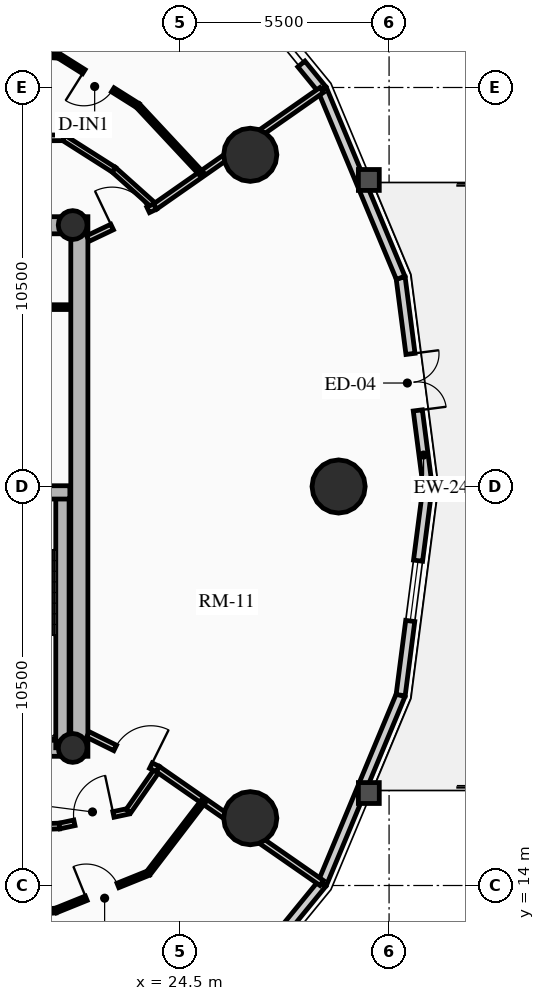
"""IFC4 building model, lengths in metres.
Left out: names, types, materials, properties, quantities, classifications, styles, units other than length and angle.
Written with IfcOpenShell. Run it as: python <this file> out.ifc"""

import sys

from ifc_helpers import new_model, si_unit, direction, frame, frame_2d, origin, origin_2d, place, context, subcontext, project, spatial, rectangle, circle, hollow_circle, extrude, source, transform, mapped, element, fill, save


model = new_model("IFC4")
c1 = context("Model", 3, precision=1e-05, world=origin(), true_north=direction((0.0, 1.0)))
c2 = subcontext(c1, "Body", "Model", "MODEL_VIEW")
j1 = project(units=[si_unit("LENGTHUNIT", "METRE"), si_unit("PLANEANGLEUNIT", "RADIAN")], contexts=[c1])
p1 = place(None, origin())
s1 = spatial("IfcSite", under=j1, at=p1, CompositionType="ELEMENT")
p2 = place(p1, origin())
s2 = spatial("IfcBuilding", under=s1, at=p2, CompositionType="ELEMENT")
p3 = place(p2, frame((0.0, 0.0, 144.04)))
s3 = spatial("IfcBuildingStorey", under=s2, at=p3, CompositionType="ELEMENT", Elevation=144.04)
p4 = place(p3, frame((21.85, 17.4, 0.0), z_axis=(0.0, 0.0, 1.0), x_axis=(0.0, 1.0, 0.0)))
e1 = element("IfcWall", 1, at=p4, inside=s3, PredefinedType="SHEAR", context=c2, shape_type="SweptSolid", body=[
    extrude(rectangle(XDim=14.2, YDim=0.45, at=frame_2d((7.1, 0.0))), origin(), (0.0, 0.0, 1.0), 3.06),
])
p5 = place(p3, frame((11.15, 17.625, 0.0), z_axis=(0.0, 0.0, 1.0), x_axis=(1.0, 0.0, 0.0)))
e2 = element("IfcWall", 2, at=p5, inside=s3, PredefinedType="SHEAR", context=c2, shape_type="SweptSolid", body=[
    extrude(rectangle(XDim=10.7, YDim=0.45, at=frame_2d((5.35, 0.0))), origin(), (0.0, 0.0, 1.0), 3.06),
])
m1 = source(origin(), c2, "Body", "SweptSolid", [
    extrude(rectangle(XDim=1.5, YDim=2.02, at=frame_2d((0.75, 1.01))), frame((0.0, 0.235, 0.0), z_axis=(0.0, -1.0, 0.0), x_axis=(1.0, 0.0, 0.0)), (0.0, 0.0, 1.0), 0.47),
])
p6 = place(p5, frame((5.45, 0.0, 0.0)))
e3 = element("IfcOpeningElement", 3, at=p6, cuts=e2, PredefinedType="OPENING", context=c2, shape_type="MappedRepresentation", body=[
    mapped(m1, transform((0.0, 0.0, 0.0), x_axis=(1.0, 0.0, 0.0), y_axis=(0.0, 1.0, 0.0), z_axis=(0.0, 0.0, 1.0), scale=1.0)),
])
p7 = place(p3, frame((11.15, 31.375, 0.0), z_axis=(0.0, 0.0, 1.0), x_axis=(1.0, 0.0, 0.0)))
e4 = element("IfcWall", 4, at=p7, inside=s3, PredefinedType="SHEAR", context=c2, shape_type="SweptSolid", body=[
    extrude(rectangle(XDim=10.7, YDim=0.45, at=frame_2d((5.35, 0.0))), origin(), (0.0, 0.0, 1.0), 3.06),
])
p8 = place(p7, frame((4.6, 0.0, 0.0)))
e5 = element("IfcOpeningElement", 5, at=p8, cuts=e4, PredefinedType="OPENING", context=c2, shape_type="MappedRepresentation", body=[
    mapped(m1, transform((0.0, 0.0, 0.0), x_axis=(1.0, 0.0, 0.0), y_axis=(0.0, 1.0, 0.0), z_axis=(0.0, 0.0, 1.0), scale=1.0)),
])
p9 = place(p3, frame((21.405, 17.625, 0.0), z_axis=(0.0, 0.0, 1.0), x_axis=(0.0, 1.0, 0.0)))
e6 = element("IfcWall", 6, at=p9, inside=s3, PredefinedType="SHEAR", context=c2, shape_type="SweptSolid", body=[
    extrude(rectangle(XDim=6.72, YDim=0.35, at=frame_2d((3.36, 0.0))), origin(), (0.0, 0.0, 1.0), 3.06),
])
p10 = place(p3, frame((18.315, 24.345, 0.0), z_axis=(0.0, 0.0, 1.0), x_axis=(1.0, 0.0, 0.0)))
e7 = element("IfcWall", 7, at=p10, inside=s3, PredefinedType="SHEAR", context=c2, shape_type="SweptSolid", body=[
    extrude(rectangle(XDim=3.285, YDim=0.35, at=frame_2d((1.643, 0.0))), origin(), (0.0, 0.0, 1.0), 3.06),
])
for number, where, z_axis, x_axis in (
    (8, (21.675, 17.62, 0.0), (0.0, 0.0, 1.0), (1.0, 0.0, 0.0)),
    (9, (21.675, 31.38, 0.0), (0.0, 0.0, 1.0), (1.0, 0.0, 0.0)),
):
    element("IfcColumn", number, at=place(p3, frame(where, z_axis=z_axis, x_axis=x_axis)), inside=s3, PredefinedType="COLUMN", context=c2, shape_type="SweptSolid", body=[
        extrude(hollow_circle(Radius=0.38, WallThickness=0.032, at=origin_2d()), origin(), (0.0, 0.0, 1.0), 3.06),
    ])
for number, where, z_axis, x_axis in (
    (10, (28.672, 24.5, 0.0), (0.0, 0.0, 1.0), (1.0, 0.0, 0.0)),
    (11, (26.347, 33.229, 0.0), (0.0, 0.0, 1.0), (1.0, 0.0, 0.0)),
    (12, (26.347, 15.771, 0.0), (0.0, 0.0, 1.0), (1.0, 0.0, 0.0)),
):
    element("IfcColumn", number, at=place(p3, frame(where, z_axis=z_axis, x_axis=x_axis)), inside=s3, PredefinedType="USERDEFINED", context=c2, shape_type="SweptSolid", body=[
        extrude(circle(Radius=0.7, at=origin_2d()), origin(), (0.0, 0.0, 1.0), 3.06),
    ])
p11 = place(p3, frame((30.305, 29.991, 0.0), z_axis=(0.0, 0.0, 1.0), x_axis=(0.128266533912, -0.991739732126, 0.0)))
e13 = element("IfcWall", 13, at=p11, inside=s3, PredefinedType="SOLIDWALL", context=c2, shape_type="SweptSolid", body=[
    extrude(rectangle(XDim=5.537, YDim=0.24, at=frame_2d((2.769, 0.0))), origin(), (0.0, 0.0, 1.0), 2.229),
])
m2 = source(origin(), c2, "Body", "SweptSolid", [
    extrude(rectangle(XDim=1.5, YDim=2.015, at=frame_2d((0.75, 1.007))), frame((0.0, 0.13, 0.0), z_axis=(0.0, -1.0, 0.0), x_axis=(1.0, 0.0, 0.0)), (0.0, 0.0, 1.0), 0.26),
])
p12 = place(p11, frame((2.018, 0.0, 0.0)))
e14 = element("IfcOpeningElement", 14, at=p12, cuts=e13, PredefinedType="OPENING", context=c2, shape_type="MappedRepresentation", body=[
    mapped(m2, transform((0.0, 0.0, 0.0), x_axis=(1.0, 0.0, 0.0), y_axis=(0.0, 1.0, 0.0), z_axis=(0.0, 0.0, 1.0), scale=1.0)),
])
p13 = place(p3, frame((28.243, 34.945, 0.0), z_axis=(0.0, 0.0, 1.0), x_axis=(0.384259959969, -0.923224936386, 0.0)))
e15 = element("IfcWall", 15, at=p13, inside=s3, PredefinedType="SOLIDWALL", context=c2, shape_type="SweptSolid", body=[
    extrude(rectangle(XDim=5.365, YDim=0.24, at=frame_2d((2.683, 0.0))), origin(), (0.0, 0.0, 1.0), 2.229),
])
p14 = place(p3, frame((27.692, 35.619, 0.0), z_axis=(0.0, 0.0, 1.0), x_axis=(0.632702874536, -0.774394649099, 0.0)))
e16 = element("IfcWall", 16, at=p14, inside=s3, PredefinedType="SOLIDWALL", context=c2, shape_type="SweptSolid", body=[
    extrude(rectangle(XDim=0.87, YDim=0.24, at=frame_2d((0.435, 0.0))), origin(), (0.0, 0.0, 1.0), 2.229),
])
p15 = place(p3, frame((28.243, 14.055, 0.0), z_axis=(0.0, 0.0, 1.0), x_axis=(-0.632598524901, -0.774479894053, 0.0)))
e17 = element("IfcWall", 17, at=p15, inside=s3, PredefinedType="SOLIDWALL", context=c2, shape_type="SweptSolid", body=[
    extrude(rectangle(XDim=5.076, YDim=0.24, at=frame_2d((2.538, 0.0))), origin(), (0.0, 0.0, 1.0), 2.229),
])
m3 = source(origin(), c2, "Body", "SweptSolid", [
    extrude(rectangle(XDim=1.6, YDim=1.3, at=frame_2d((0.8, 0.65))), frame((0.0, 0.13, 0.0), z_axis=(0.0, -1.0, 0.0), x_axis=(1.0, 0.0, 0.0)), (0.0, 0.0, 1.0), 0.26),
])
p16 = place(p15, frame((1.738, 0.0, 0.65)))
e18 = element("IfcOpeningElement", 18, at=p16, cuts=e17, PredefinedType="OPENING", context=c2, shape_type="MappedRepresentation", body=[
    mapped(m3, transform((0.0, 0.0, 0.0), x_axis=(1.0, 0.0, 0.0), y_axis=(0.0, 1.0, 0.0), z_axis=(0.0, 0.0, 1.0), scale=1.0)),
])
p17 = place(p3, frame((30.305, 19.009, 0.0), z_axis=(0.0, 0.0, 1.0), x_axis=(-0.384259959969, -0.923224936386, 0.0)))
e19 = element("IfcWall", 19, at=p17, inside=s3, PredefinedType="SOLIDWALL", context=c2, shape_type="SweptSolid", body=[
    extrude(rectangle(XDim=5.365, YDim=0.24, at=frame_2d((2.683, 0.0))), origin(), (0.0, 0.0, 1.0), 2.229),
])
p18 = place(p3, frame((31.015, 24.5, 0.0), z_axis=(0.0, 0.0, 1.0), x_axis=(-0.128266533912, -0.991739732126, 0.0)))
e20 = element("IfcWall", 20, at=p18, inside=s3, PredefinedType="SOLIDWALL", context=c2, shape_type="SweptSolid", body=[
    extrude(rectangle(XDim=5.537, YDim=0.24, at=frame_2d((2.769, 0.0))), origin(), (0.0, 0.0, 1.0), 2.229),
])
p19 = place(p18, frame((1.968, 0.0, 0.65)))
e21 = element("IfcOpeningElement", 21, at=p19, cuts=e20, PredefinedType="OPENING", context=c2, shape_type="MappedRepresentation", body=[
    mapped(m3, transform((0.0, 0.0, 0.0), x_axis=(1.0, 0.0, 0.0), y_axis=(0.0, 1.0, 0.0), z_axis=(0.0, 0.0, 1.0), scale=1.0)),
])
p20 = place(p3, frame((18.38, 29.22, 0.0), z_axis=(0.0, 0.0, 1.0), x_axis=(1.0, 0.0, 0.0)))
e22 = element("IfcWall", 22, at=p20, inside=s3, PredefinedType="PARTITIONING", context=c2, shape_type="SweptSolid", body=[
    extrude(rectangle(XDim=3.22, YDim=0.125, at=frame_2d((1.61, 0.0))), origin(), (0.0, 0.0, 1.0), 2.242),
])
p21 = place(p3, frame((23.841, 31.866, 0.0), z_axis=(0.0, 0.0, 1.0), x_axis=(-0.74511843306, 0.666932171, 0.0)))
e23 = element("IfcWall", 23, at=p21, inside=s3, PredefinedType="PARTITIONING", context=c2, shape_type="SweptSolid", body=[
    extrude(rectangle(XDim=1.455, YDim=0.15, at=frame_2d((0.728, 0.0))), origin(), (0.0, 0.0, 1.0), 2.275),
])
p22 = place(p3, frame((22.756, 32.836, 0.0), z_axis=(0.0, 0.0, 1.0), x_axis=(-0.843828401801, 0.536613108593, 0.0)))
e24 = element("IfcWall", 24, at=p22, inside=s3, PredefinedType="PARTITIONING", context=c2, shape_type="SweptSolid", body=[
    extrude(rectangle(XDim=1.565, YDim=0.15, at=frame_2d((0.783, 0.0))), origin(), (0.0, 0.0, 1.0), 2.275),
])
p23 = place(p3, frame((21.435, 33.677, 0.0), z_axis=(0.0, 0.0, 1.0), x_axis=(-0.999986775557, -0.005142831114, 0.0)))
e25 = element("IfcWall", 25, at=p23, inside=s3, PredefinedType="PARTITIONING", context=c2, shape_type="SweptSolid", body=[
    extrude(rectangle(XDim=3.323, YDim=0.15, at=frame_2d((1.662, 0.0))), origin(), (0.0, 0.0, 1.0), 2.275),
])
m4 = source(origin(), c2, "Body", "SweptSolid", [
    extrude(rectangle(XDim=1.05, YDim=2.015, at=frame_2d((0.525, 1.007))), frame((0.0, 0.085, 0.0), z_axis=(0.0, -1.0, 0.0), x_axis=(1.0, 0.0, 0.0)), (0.0, 0.0, 1.0), 0.17),
])
p24 = place(p23, frame((1.645, 0.0, 0.0)))
e26 = element("IfcOpeningElement", 26, at=p24, cuts=e25, PredefinedType="OPENING", context=c2, shape_type="MappedRepresentation", body=[
    mapped(m4, transform((0.0, 0.0, 0.0), x_axis=(1.0, 0.0, 0.0), y_axis=(0.0, 1.0, 0.0), z_axis=(0.0, 0.0, 1.0), scale=1.0)),
])
p25 = place(p3, frame((14.813, 15.341, 0.0), z_axis=(0.0, 0.0, 1.0), x_axis=(0.999402077819, 0.034575813105, 0.0)))
e27 = element("IfcWall", 27, at=p25, inside=s3, PredefinedType="PARTITIONING", context=c2, shape_type="SweptSolid", body=[
    extrude(rectangle(XDim=6.517, YDim=0.15, at=frame_2d((3.259, 0.0))), origin(), (0.0, 0.0, 1.0), 2.275),
])
p26 = place(p3, frame((21.326, 15.566, 0.0), z_axis=(0.0, 0.0, 1.0), x_axis=(0.977908238308, 0.209034632176, 0.0)))
e28 = element("IfcWall", 28, at=p26, inside=s3, PredefinedType="PARTITIONING", context=c2, shape_type="SweptSolid", body=[
    extrude(rectangle(XDim=1.855, YDim=0.15, at=frame_2d((0.927, 0.0))), origin(), (0.0, 0.0, 1.0), 2.275),
])
p27 = place(p26, frame((0.402, 0.0, 0.0)))
e29 = element("IfcOpeningElement", 29, at=p27, cuts=e28, PredefinedType="OPENING", context=c2, shape_type="MappedRepresentation", body=[
    mapped(m4, transform((0.0, 0.0, 0.0), x_axis=(1.0, 0.0, 0.0), y_axis=(0.0, 1.0, 0.0), z_axis=(0.0, 0.0, 1.0), scale=1.0)),
])
p28 = place(p3, frame((23.14, 15.954, 0.0), z_axis=(0.0, 0.0, 1.0), x_axis=(0.570699895117, 0.821158711647, 0.0)))
e30 = element("IfcWall", 30, at=p28, inside=s3, PredefinedType="PARTITIONING", context=c2, shape_type="SweptSolid", body=[
    extrude(rectangle(XDim=1.354, YDim=0.15, at=frame_2d((0.677, 0.0))), origin(), (0.0, 0.0, 1.0), 2.275),
])
p29 = place(p3, frame((23.841, 31.866, 0.0), z_axis=(0.0, 0.0, 1.0), x_axis=(0.819514693563, 0.573058170724, 0.0)))
e31 = element("IfcWall", 31, at=p29, inside=s3, PredefinedType="PARTITIONING", context=c2, shape_type="SweptSolid", body=[
    extrude(rectangle(XDim=5.352, YDim=0.16, at=frame_2d((2.676, 0.0))), origin(), (0.0, 0.0, 1.0), 2.229),
])
p30 = place(p3, frame((23.913, 17.065, 0.0), z_axis=(0.0, 0.0, 1.0), x_axis=(0.821126775727, -0.570745843773, 0.0)))
e32 = element("IfcWall", 32, at=p30, inside=s3, PredefinedType="PARTITIONING", context=c2, shape_type="SweptSolid", body=[
    extrude(rectangle(XDim=5.254, YDim=0.16, at=frame_2d((2.627, 0.0))), origin(), (0.0, 0.0, 1.0), 2.229),
])
p31 = place(p3, frame((22.075, 31.025, 0.0), z_axis=(0.0, 0.0, 1.0), x_axis=(0.902802823792, 0.430054719022, 0.0)))
e33 = element("IfcWall", 33, at=p31, inside=s3, PredefinedType="PARTITIONING", context=c2, shape_type="SweptSolid", body=[
    extrude(rectangle(XDim=1.956, YDim=0.16, at=frame_2d((0.978, 0.0))), origin(), (0.0, 0.0, 1.0), 2.275),
])
m5 = source(origin(), c2, "Body", "SweptSolid", [
    extrude(rectangle(XDim=1.05, YDim=2.015, at=frame_2d((0.525, 1.007))), frame((0.0, 0.09, 0.0), z_axis=(0.0, -1.0, 0.0), x_axis=(1.0, 0.0, 0.0)), (0.0, 0.0, 1.0), 0.18),
])
p32 = place(p31, frame((0.706, 0.0, 0.0)))
e34 = element("IfcOpeningElement", 34, at=p32, cuts=e33, PredefinedType="OPENING", context=c2, shape_type="MappedRepresentation", body=[
    mapped(m5, transform((0.0, 0.0, 0.0), x_axis=(1.0, 0.0, 0.0), y_axis=(0.0, 1.0, 0.0), z_axis=(0.0, 0.0, 1.0), scale=1.0)),
])
p33 = place(p3, frame((22.075, 17.975, 0.0), z_axis=(0.0, 0.0, 1.0), x_axis=(0.89622947115, -0.443590729212, 0.0)))
e35 = element("IfcWall", 35, at=p33, inside=s3, PredefinedType="PARTITIONING", context=c2, shape_type="SweptSolid", body=[
    extrude(rectangle(XDim=2.051, YDim=0.16, at=frame_2d((1.025, 0.0))), origin(), (0.0, 0.0, 1.0), 2.275),
])
p34 = place(p33, frame((0.801, 0.0, 0.0)))
e36 = element("IfcOpeningElement", 36, at=p34, cuts=e35, PredefinedType="OPENING", context=c2, shape_type="MappedRepresentation", body=[
    mapped(m5, transform((0.0, 0.0, 0.0), x_axis=(1.0, 0.0, 0.0), y_axis=(0.0, 1.0, 0.0), z_axis=(0.0, 0.0, 1.0), scale=1.0)),
])
p35 = place(p3, frame((25.069, 32.725, 0.0), z_axis=(0.0, 0.0, 1.0), x_axis=(-0.682321786461, 0.731051967865, 0.0)))
e37 = element("IfcWall", 37, at=p35, inside=s3, PredefinedType="PARTITIONING", context=c2, shape_type="SweptSolid", body=[
    extrude(rectangle(XDim=2.46, YDim=0.125, at=frame_2d((1.23, 0.0))), origin(), (0.0, 0.0, 1.0), 2.275),
])
p36 = place(p3, frame((23.39, 34.523, 0.0), z_axis=(0.0, 0.0, 1.0), x_axis=(-0.846355430711, 0.53261851724, 0.0)))
e38 = element("IfcWall", 38, at=p36, inside=s3, PredefinedType="PARTITIONING", context=c2, shape_type="SweptSolid", body=[
    extrude(rectangle(XDim=2.461, YDim=0.125, at=frame_2d((1.23, 0.0))), origin(), (0.0, 0.0, 1.0), 2.275),
])
m6 = source(origin(), c2, "Body", "SweptSolid", [
    extrude(rectangle(XDim=0.9, YDim=2.005, at=frame_2d((0.45, 1.002))), frame((0.0, 0.073, 0.0), z_axis=(0.0, -1.0, 0.0), x_axis=(1.0, 0.0, 0.0)), (0.0, 0.0, 1.0), 0.145),
])
p37 = place(p36, frame((0.781, 0.0, 0.0)))
e39 = element("IfcOpeningElement", 39, at=p37, cuts=e38, PredefinedType="OPENING", context=c2, shape_type="MappedRepresentation", body=[
    mapped(m6, transform((0.0, 0.0, 0.0), x_axis=(1.0, 0.0, 0.0), y_axis=(0.0, 1.0, 0.0), z_axis=(0.0, 0.0, 1.0), scale=1.0)),
])
p38 = place(p3, frame((21.308, 35.834, 0.0), z_axis=(0.0, 0.0, 1.0), x_axis=(-0.998000499874, 0.063206030185, 0.0)))
e40 = element("IfcWall", 40, at=p38, inside=s3, PredefinedType="PARTITIONING", context=c2, shape_type="SweptSolid", body=[
    extrude(rectangle(XDim=3.654, YDim=0.125, at=frame_2d((1.827, 0.0))), origin(), (0.0, 0.0, 1.0), 2.275),
])
p39 = place(p3, frame((15.285, 12.935, 0.0), z_axis=(0.0, 0.0, 1.0), x_axis=(0.997680594374, 0.068069314736, 0.0)))
e41 = element("IfcWall", 41, at=p39, inside=s3, PredefinedType="PARTITIONING", context=c2, shape_type="SweptSolid", body=[
    extrude(rectangle(XDim=5.958, YDim=0.125, at=frame_2d((2.979, 0.0))), origin(), (0.0, 0.0, 1.0), 2.275),
])
p40 = place(p3, frame((21.229, 13.341, 0.0), z_axis=(0.0, 0.0, 1.0), x_axis=(0.927177333678, 0.374622732778, 0.0)))
e42 = element("IfcWall", 42, at=p40, inside=s3, PredefinedType="PARTITIONING", context=c2, shape_type="SweptSolid", body=[
    extrude(rectangle(XDim=2.629, YDim=0.125, at=frame_2d((1.314, 0.0))), origin(), (0.0, 0.0, 1.0), 2.275),
])
p41 = place(p40, frame((0.865, 0.0, 0.0)))
e43 = element("IfcOpeningElement", 43, at=p41, cuts=e42, PredefinedType="OPENING", context=c2, shape_type="MappedRepresentation", body=[
    mapped(m6, transform((0.0, 0.0, 0.0), x_axis=(1.0, 0.0, 0.0), y_axis=(0.0, 1.0, 0.0), z_axis=(0.0, 0.0, 1.0), scale=1.0)),
])
p42 = place(p3, frame((23.667, 14.326, 0.0), z_axis=(0.0, 0.0, 1.0), x_axis=(0.60779089321, 0.794097116309, 0.0)))
e44 = element("IfcWall", 44, at=p42, inside=s3, PredefinedType="PARTITIONING", context=c2, shape_type="SweptSolid", body=[
    extrude(rectangle(XDim=2.393, YDim=0.125, at=frame_2d((1.196, 0.0))), origin(), (0.0, 0.0, 1.0), 2.275),
])
m7 = source(origin(), c2, "Body", "SweptSolid", [
    extrude(rectangle(XDim=1.6, YDim=1.3, at=frame_2d((0.8, 0.65))), frame((0.0, 0.03, 0.0), z_axis=(0.0, -1.0, 0.0), x_axis=(1.0, 0.0, 0.0)), (0.0, 0.0, 1.0), 0.06),
])
p43 = place(p19, origin())
e45 = element("IfcWindow", 45, at=p43, inside=s3, PartitioningType="SINGLE_PANEL", PredefinedType="WINDOW", context=c2, shape_type="MappedRepresentation", body=[
    mapped(m7, transform((0.0, 0.0, 0.0), x_axis=(1.0, 0.0, 0.0), y_axis=(0.0, 1.0, 0.0), z_axis=(0.0, 0.0, 1.0), scale=1.0)),
])
fill(e21, e45)
m8 = source(origin(), c2, "Body", "SweptSolid", [
    extrude(rectangle(XDim=1.5, YDim=2.015, at=frame_2d((0.75, 1.007))), frame((0.0, 0.025, 0.0), z_axis=(0.0, -1.0, 0.0), x_axis=(1.0, 0.0, 0.0)), (0.0, 0.0, 1.0), 0.05),
])
p44 = place(p12, origin())
e46 = element("IfcDoor", 46, at=p44, inside=s3, OperationType="DOUBLE_DOOR_SINGLE_SWING", PredefinedType="DOOR", context=c2, shape_type="MappedRepresentation", body=[
    mapped(m8, transform((0.0, 0.0, 0.0), x_axis=(1.0, 0.0, 0.0), y_axis=(0.0, 1.0, 0.0), z_axis=(0.0, 0.0, 1.0), scale=1.0)),
])
fill(e14, e46)
m9 = source(origin(), c2, "Body", "SweptSolid", [
    extrude(rectangle(XDim=1.05, YDim=2.015, at=frame_2d((0.525, 1.007))), frame((0.0, 0.025, 0.0), z_axis=(0.0, -1.0, 0.0), x_axis=(1.0, 0.0, 0.0)), (0.0, 0.0, 1.0), 0.05),
])
p45 = place(p32, origin())
e47 = element("IfcDoor", 47, at=p45, inside=s3, OperationType="SINGLE_SWING_LEFT", PredefinedType="DOOR", context=c2, shape_type="MappedRepresentation", body=[
    mapped(m9, transform((0.0, 0.0, 0.0), x_axis=(1.0, 0.0, 0.0), y_axis=(0.0, 1.0, 0.0), z_axis=(0.0, 0.0, 1.0), scale=1.0)),
])
fill(e34, e47)
p46 = place(p34, origin())
e48 = element("IfcDoor", 48, at=p46, inside=s3, OperationType="SINGLE_SWING_RIGHT", PredefinedType="DOOR", context=c2, shape_type="MappedRepresentation", body=[
    mapped(m9, transform((0.0, 0.0, 0.0), x_axis=(1.0, 0.0, 0.0), y_axis=(0.0, 1.0, 0.0), z_axis=(0.0, 0.0, 1.0), scale=1.0)),
])
fill(e36, e48)
m10 = source(origin(), c2, "Body", "SweptSolid", [
    extrude(rectangle(XDim=0.9, YDim=2.005, at=frame_2d((0.45, 1.002))), frame((0.0, 0.025, 0.0), z_axis=(0.0, -1.0, 0.0), x_axis=(1.0, 0.0, 0.0)), (0.0, 0.0, 1.0), 0.05),
])
p47 = place(p37, origin())
e49 = element("IfcDoor", 49, at=p47, inside=s3, OperationType="SINGLE_SWING_RIGHT", PredefinedType="DOOR", context=c2, shape_type="MappedRepresentation", body=[
    mapped(m10, transform((0.0, 0.0, 0.0), x_axis=(1.0, 0.0, 0.0), y_axis=(0.0, 1.0, 0.0), z_axis=(0.0, 0.0, 1.0), scale=1.0)),
])
fill(e39, e49)
p48 = place(p27, origin())
e50 = element("IfcDoor", 50, at=p48, inside=s3, OperationType="SINGLE_SWING_RIGHT", PredefinedType="DOOR", context=c2, shape_type="MappedRepresentation", body=[
    mapped(m9, transform((0.0, 0.0, 0.0), x_axis=(1.0, 0.0, 0.0), y_axis=(0.0, 1.0, 0.0), z_axis=(0.0, 0.0, 1.0), scale=1.0)),
])
fill(e29, e50)
p49 = place(p41, origin())
e51 = element("IfcDoor", 51, at=p49, inside=s3, OperationType="SINGLE_SWING_LEFT", PredefinedType="DOOR", context=c2, shape_type="MappedRepresentation", body=[
    mapped(m10, transform((0.0, 0.0, 0.0), x_axis=(1.0, 0.0, 0.0), y_axis=(0.0, 1.0, 0.0), z_axis=(0.0, 0.0, 1.0), scale=1.0)),
])
fill(e43, e51)
save(model, sys.argv[1])
